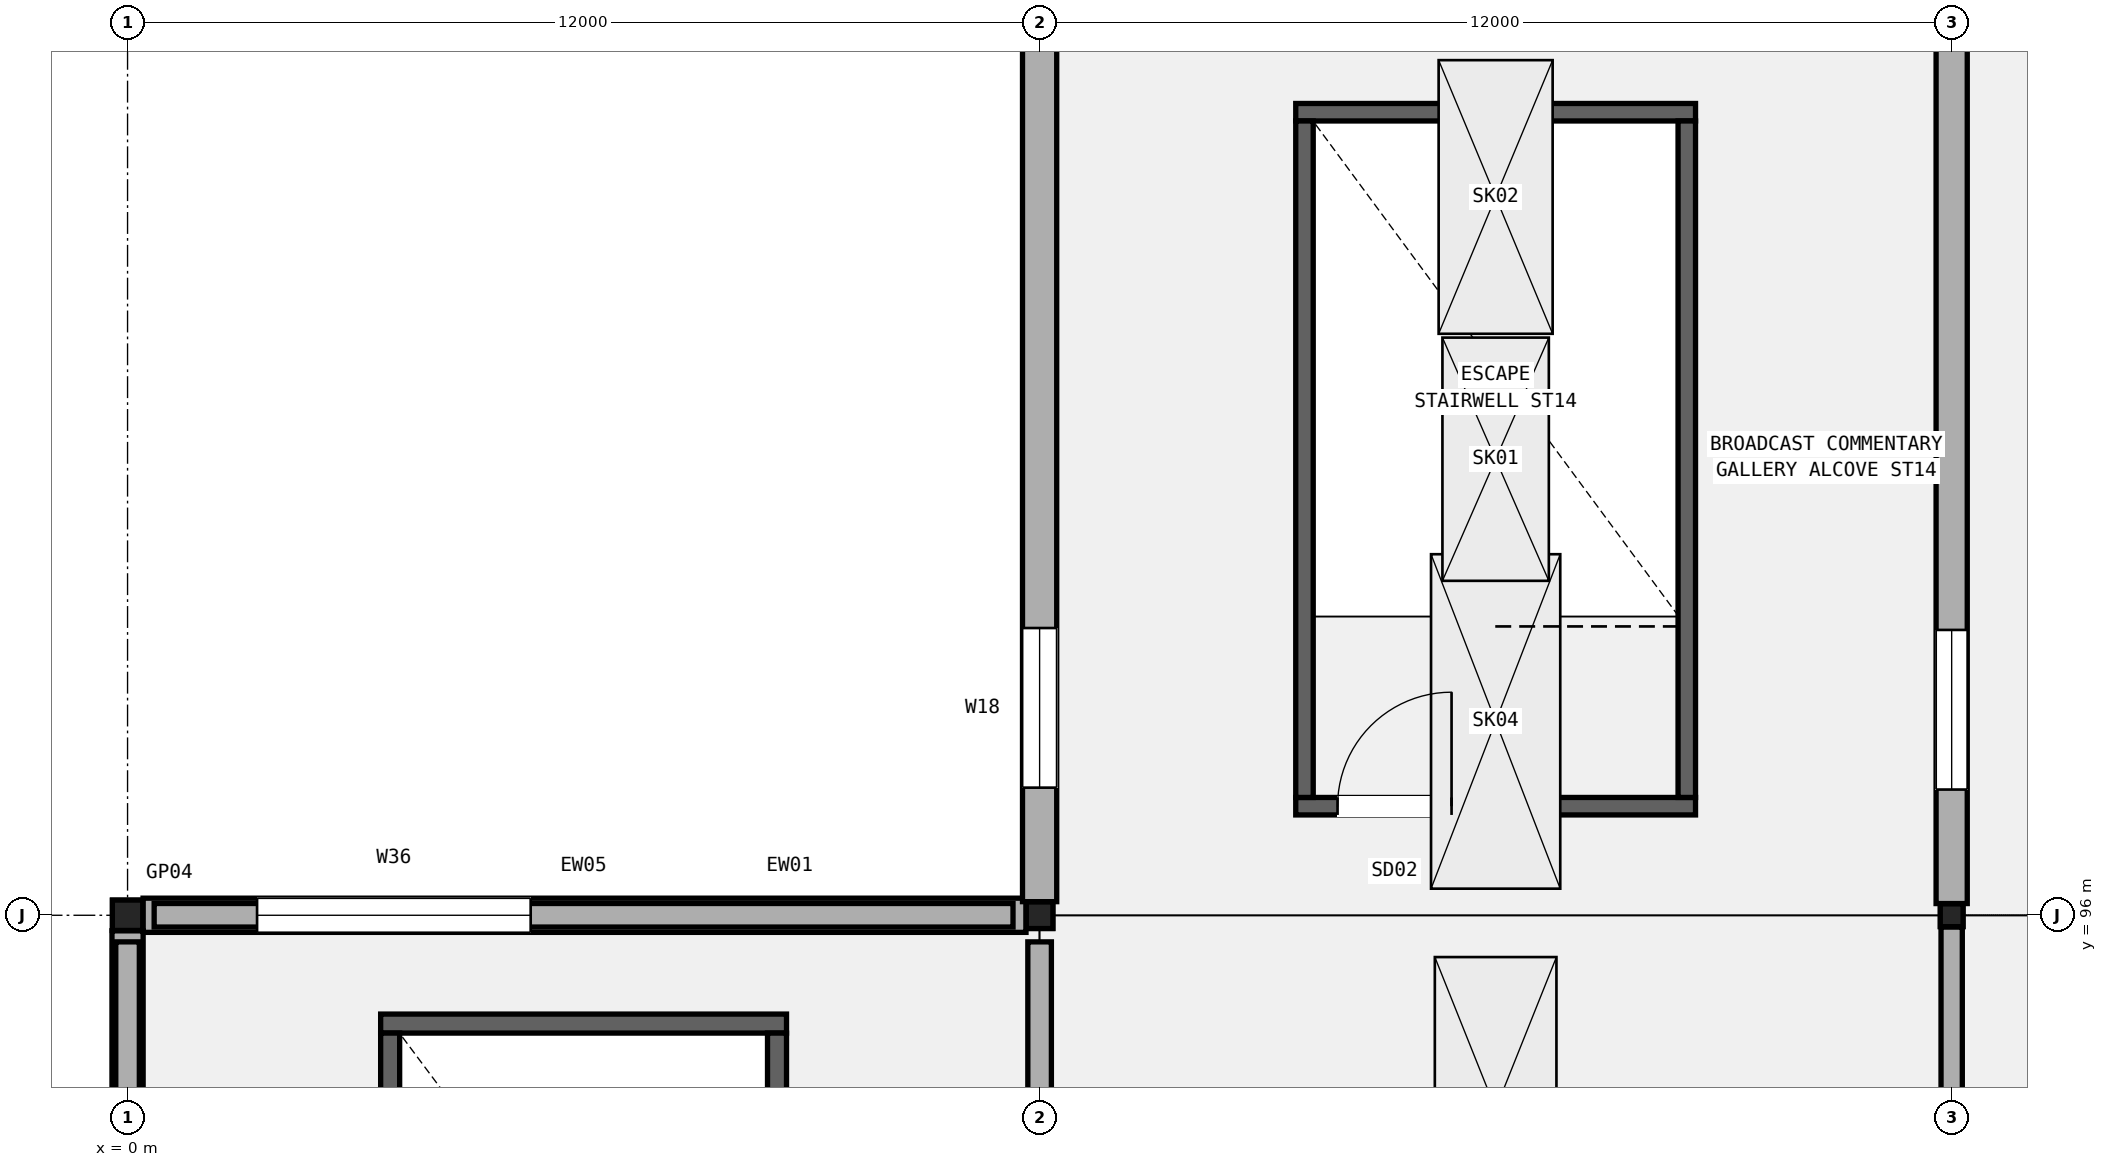
"""IFC4 building model, lengths in metres.
Left out: names, types, materials, properties, quantities, classifications, styles, units other than length and angle.
Written with IfcOpenShell. Run it as: python <this file> out.ifc"""

import sys

from ifc_helpers import new_model, si_unit, direction, frame, frame_2d, origin, origin_2d, place, context, subcontext, project, spatial, rectangle, hollow_rectangle, extrude, element, fill, save


model = new_model("IFC4")
c1 = context("Model", 3, precision=1e-05, world=origin(), true_north=direction((0.0, 1.0)))
c2 = subcontext(c1, "Body", "Model", "MODEL_VIEW")
j1 = project(units=[si_unit("LENGTHUNIT", "METRE"), si_unit("PLANEANGLEUNIT", "RADIAN")], contexts=[c1])
p1 = place(None, origin())
s1 = spatial("IfcSite", under=j1, at=p1, CompositionType="ELEMENT")
p2 = place(p1, origin())
s2 = spatial("IfcBuilding", under=s1, at=p2, CompositionType="ELEMENT")
p3 = place(p2, frame((0.0, 0.0, 25.8)))
s3 = spatial("IfcBuildingStorey", under=s2, at=p3, CompositionType="ELEMENT", Elevation=25.8)
p4 = place(p3, frame((0.0, 96.0, 0.0), z_axis=(0.0, 0.0, 1.0), x_axis=(1.0, 0.0, 0.0)))
e1 = element("IfcColumn", 1, at=p4, inside=s3, PredefinedType="COLUMN", context=c2, shape_type="SweptSolid", body=[
    extrude(hollow_rectangle(XDim=0.4, YDim=0.4, WallThickness=0.016, InnerFilletRadius=0.016, OuterFilletRadius=0.032, at=origin_2d()), origin(), (0.0, 0.0, 1.0), 5.4),
])
p5 = place(p3, frame((12.0, 96.0, 0.0), z_axis=(0.0, 0.0, 1.0), x_axis=(1.0, 0.0, 0.0)))
e2 = element("IfcColumn", 2, at=p5, inside=s3, PredefinedType="COLUMN", context=c2, shape_type="SweptSolid", body=[
    extrude(hollow_rectangle(XDim=0.35, YDim=0.35, WallThickness=0.016, InnerFilletRadius=0.016, OuterFilletRadius=0.032, at=origin_2d()), origin(), (0.0, 0.0, 1.0), 5.4),
])
p6 = place(p3, frame((24.0, 96.0, 0.0), z_axis=(0.0, 0.0, 1.0), x_axis=(1.0, 0.0, 0.0)))
e3 = element("IfcColumn", 3, at=p6, inside=s3, PredefinedType="COLUMN", context=c2, shape_type="SweptSolid", body=[
    extrude(hollow_rectangle(XDim=0.3, YDim=0.3, WallThickness=0.012, InnerFilletRadius=0.012, OuterFilletRadius=0.024, at=origin_2d()), origin(), (0.0, 0.0, 1.0), 5.4),
])
p7 = place(p3, frame((0.204, 96.0, 0.0), z_axis=(0.0, 0.0, 1.0), x_axis=(1.0, 0.0, 0.0)))
e4 = element("IfcWall", 4, at=p7, inside=s3, PredefinedType="SOLIDWALL", context=c2, shape_type="SweptSolid", body=[
    extrude(rectangle(XDim=11.617, YDim=0.45, at=frame_2d((5.809, 0.0))), origin(), (0.0, 0.0, 1.0), 4.452),
])
p8 = place(p7, frame((1.5, 0.0, 0.95)))
e5 = element("IfcOpeningElement", 5, at=p8, cuts=e4, PredefinedType="OPENING", context=c2, shape_type="SweptSolid", body=[
    extrude(rectangle(XDim=3.6, YDim=2.15, at=frame_2d((1.8, 1.075))), frame((0.0, 0.235, 0.0), z_axis=(0.0, -1.0, 0.0), x_axis=(1.0, 0.0, 0.0)), (0.0, 0.0, 1.0), 0.47),
])
p9 = place(p3, frame((0.0, 84.304, 0.0), z_axis=(0.0, 0.0, 1.0), x_axis=(0.0, 1.0, 0.0)))
e6 = element("IfcWall", 6, at=p9, inside=s3, PredefinedType="SOLIDWALL", context=c2, shape_type="SweptSolid", body=[
    extrude(rectangle(XDim=11.492, YDim=0.41, at=frame_2d((5.746, 0.0))), origin(), (0.0, 0.0, 1.0), 4.44),
])
p10 = place(p9, frame((1.5, 0.0, 0.95)))
e7 = element("IfcOpeningElement", 7, at=p10, cuts=e6, PredefinedType="OPENING", context=c2, shape_type="SweptSolid", body=[
    extrude(rectangle(XDim=0.9, YDim=2.1, at=frame_2d((0.45, 1.05))), frame((0.0, 0.215, 0.0), z_axis=(0.0, -1.0, 0.0), x_axis=(1.0, 0.0, 0.0)), (0.0, 0.0, 1.0), 0.43),
])
p11 = place(p3, frame((24.0, 84.179, 0.0), z_axis=(0.0, 0.0, 1.0), x_axis=(0.0, 1.0, 0.0)))
e8 = element("IfcWall", 8, at=p11, inside=s3, PredefinedType="SOLIDWALL", context=c2, shape_type="SweptSolid", body=[
    extrude(rectangle(XDim=11.667, YDim=0.28, at=frame_2d((5.833, 0.0))), origin(), (0.0, 0.0, 1.0), 4.13),
])
p12 = place(p11, frame((1.5, 0.0, 0.95)))
e9 = element("IfcOpeningElement", 9, at=p12, cuts=e8, PredefinedType="OPENING", context=c2, shape_type="SweptSolid", body=[
    extrude(rectangle(XDim=1.95, YDim=2.35, at=frame_2d((0.975, 1.175))), frame((0.0, 0.15, 0.0), z_axis=(0.0, -1.0, 0.0), x_axis=(1.0, 0.0, 0.0)), (0.0, 0.0, 1.0), 0.3),
])
p13 = place(p3, frame((12.0, 96.179, 0.0), z_axis=(0.0, 0.0, 1.0), x_axis=(0.0, 1.0, 0.0)))
e10 = element("IfcWall", 10, at=p13, inside=s3, PredefinedType="SOLIDWALL", context=c2, shape_type="SweptSolid", body=[
    extrude(rectangle(XDim=11.667, YDim=0.45, at=frame_2d((5.833, 0.0))), origin(), (0.0, 0.0, 1.0), 4.34),
])
p14 = place(p13, frame((1.5, 0.0, 0.95)))
e11 = element("IfcOpeningElement", 11, at=p14, cuts=e10, PredefinedType="OPENING", context=c2, shape_type="SweptSolid", body=[
    extrude(rectangle(XDim=2.1, YDim=1.85, at=frame_2d((1.05, 0.925))), frame((0.0, 0.235, 0.0), z_axis=(0.0, -1.0, 0.0), x_axis=(1.0, 0.0, 0.0)), (0.0, 0.0, 1.0), 0.47),
])
p15 = place(p3, frame((24.0, 96.154, 0.0), z_axis=(0.0, 0.0, 1.0), x_axis=(0.0, 1.0, 0.0)))
e12 = element("IfcWall", 12, at=p15, inside=s3, PredefinedType="SOLIDWALL", context=c2, shape_type="SweptSolid", body=[
    extrude(rectangle(XDim=11.717, YDim=0.41, at=frame_2d((5.858, 0.0))), origin(), (0.0, 0.0, 1.0), 4.13),
])
p16 = place(p15, frame((1.5, 0.0, 0.95)))
e13 = element("IfcOpeningElement", 13, at=p16, cuts=e12, PredefinedType="OPENING", context=c2, shape_type="SweptSolid", body=[
    extrude(rectangle(XDim=2.1, YDim=2.25, at=frame_2d((1.05, 1.125))), frame((0.0, 0.215, 0.0), z_axis=(0.0, -1.0, 0.0), x_axis=(1.0, 0.0, 0.0)), (0.0, 0.0, 1.0), 0.43),
])
for number, where, z_axis, x_axis in (
    (14, (0.35, 96.0, 5.4), (0.0, 0.0, 1.0), (1.0, 0.0, 0.0)),
    (15, (0.0, 84.35, 5.4), (0.0, 0.0, 1.0), (0.0, 1.0, 0.0)),
    (16, (12.0, 84.35, 5.4), (0.0, 0.0, 1.0), (0.0, 1.0, 0.0)),
):
    element("IfcWall", number, at=place(p3, frame(where, z_axis=z_axis, x_axis=x_axis)), inside=s3, PredefinedType="SOLIDWALL", context=c2, shape_type="SweptSolid", body=[
        extrude(rectangle(XDim=11.3, YDim=0.31, at=frame_2d((5.65, 0.0))), origin(), (0.0, 0.0, 1.0), 1.08),
    ])
p17 = place(p3, frame((3.33, 94.575, 0.0), z_axis=(0.0, 0.0, 1.0), x_axis=(1.0, 0.0, 0.0)))
e17 = element("IfcWall", 17, at=p17, inside=s3, PredefinedType="SHEAR", context=c2, shape_type="SweptSolid", body=[
    extrude(rectangle(XDim=5.34, YDim=0.25, at=frame_2d((2.67, 0.0))), origin(), (0.0, 0.0, 1.0), 5.04),
])
for number, where, z_axis, x_axis in (
    (18, (3.455, 85.55, 0.0), (0.0, 0.0, 1.0), (0.0, 1.0, 0.0)),
    (19, (8.545, 85.55, 0.0), (0.0, 0.0, 1.0), (0.0, 1.0, 0.0)),
):
    element("IfcWall", number, at=place(p3, frame(where, z_axis=z_axis, x_axis=x_axis)), inside=s3, PredefinedType="SHEAR", context=c2, shape_type="SweptSolid", body=[
        extrude(rectangle(XDim=8.9, YDim=0.25, at=frame_2d((4.45, 0.0))), origin(), (0.0, 0.0, 1.0), 5.04),
    ])
p18 = place(p3, frame((15.37, 97.435, 0.0), z_axis=(0.0, 0.0, 1.0), x_axis=(1.0, 0.0, 0.0)))
e20 = element("IfcWall", 20, at=p18, inside=s3, PredefinedType="SHEAR", context=c2, shape_type="SweptSolid", body=[
    extrude(rectangle(XDim=5.26, YDim=0.23, at=frame_2d((2.63, 0.0))), origin(), (0.0, 0.0, 1.0), 5.04),
])
p19 = place(p18, frame((0.55, 0.0, 0.0)))
e21 = element("IfcOpeningElement", 21, at=p19, cuts=e20, PredefinedType="OPENING", context=c2, shape_type="SweptSolid", body=[
    extrude(rectangle(XDim=1.5, YDim=2.2, at=frame_2d((0.75, 1.1))), frame((0.0, 0.125, 0.0), z_axis=(0.0, -1.0, 0.0), x_axis=(1.0, 0.0, 0.0)), (0.0, 0.0, 1.0), 0.25),
])
p20 = place(p3, frame((15.37, 106.565, 0.0), z_axis=(0.0, 0.0, 1.0), x_axis=(1.0, 0.0, 0.0)))
e22 = element("IfcWall", 22, at=p20, inside=s3, PredefinedType="SHEAR", context=c2, shape_type="SweptSolid", body=[
    extrude(rectangle(XDim=5.26, YDim=0.23, at=frame_2d((2.63, 0.0))), origin(), (0.0, 0.0, 1.0), 5.04),
])
for number, where, z_axis, x_axis in (
    (23, (15.485, 97.55, 0.0), (0.0, 0.0, 1.0), (0.0, 1.0, 0.0)),
    (24, (20.515, 97.55, 0.0), (0.0, 0.0, 1.0), (0.0, 1.0, 0.0)),
):
    element("IfcWall", number, at=place(p3, frame(where, z_axis=z_axis, x_axis=x_axis)), inside=s3, PredefinedType="SHEAR", context=c2, shape_type="SweptSolid", body=[
        extrude(rectangle(XDim=8.9, YDim=0.23, at=frame_2d((4.45, 0.0))), origin(), (0.0, 0.0, 1.0), 5.04),
    ])
p21 = place(p8, origin())
e25 = element("IfcWindow", 25, at=p21, inside=s3, PartitioningType="SINGLE_PANEL", PredefinedType="WINDOW", context=c2, shape_type="SweptSolid", body=[
    extrude(rectangle(XDim=3.6, YDim=2.15, at=frame_2d((1.8, 1.075))), frame((0.0, 0.03, 0.0), z_axis=(0.0, -1.0, 0.0), x_axis=(1.0, 0.0, 0.0)), (0.0, 0.0, 1.0), 0.06),
])
fill(e5, e25)
p22 = place(p14, origin())
e26 = element("IfcWindow", 26, at=p22, inside=s3, PartitioningType="SINGLE_PANEL", PredefinedType="WINDOW", context=c2, shape_type="SweptSolid", body=[
    extrude(rectangle(XDim=2.1, YDim=1.85, at=frame_2d((1.05, 0.925))), frame((0.0, 0.03, 0.0), z_axis=(0.0, -1.0, 0.0), x_axis=(1.0, 0.0, 0.0)), (0.0, 0.0, 1.0), 0.06),
])
fill(e11, e26)
p23 = place(p16, origin())
e27 = element("IfcWindow", 27, at=p23, inside=s3, PartitioningType="SINGLE_PANEL", PredefinedType="WINDOW", context=c2, shape_type="SweptSolid", body=[
    extrude(rectangle(XDim=2.1, YDim=2.25, at=frame_2d((1.05, 1.125))), frame((0.0, 0.03, 0.0), z_axis=(0.0, -1.0, 0.0), x_axis=(1.0, 0.0, 0.0)), (0.0, 0.0, 1.0), 0.06),
])
fill(e13, e27)
p24 = place(p2, frame((0.0, 0.0, 31.2)))
p25 = place(p24, frame((0.0, 0.0, -0.36)))
p26 = place(p25, frame((18.0, 93.45, 0.0)))
p27 = place(p26, frame((0.0, 0.0, 0.31)))
e28 = element("IfcWindow", 28, at=p27, inside=s3, PartitioningType="SINGLE_PANEL", PredefinedType="SKYLIGHT", context=c2, shape_type="SweptSolid", body=[
    extrude(rectangle(XDim=4.0, YDim=1.6, at=origin_2d()), origin(), (0.0, 0.0, 1.0), 0.05),
])
p28 = place(p24, frame((0.0, 0.0, -0.36)))
p29 = place(p28, frame((18.0, 98.55, 0.0)))
p30 = place(p29, frame((0.0, 0.0, 0.31)))
e29 = element("IfcWindow", 29, at=p30, inside=s3, PartitioningType="SINGLE_PANEL", PredefinedType="SKYLIGHT", context=c2, shape_type="SweptSolid", body=[
    extrude(rectangle(XDim=4.4, YDim=1.7, at=origin_2d()), origin(), (0.0, 0.0, 1.0), 0.05),
])
p31 = place(p28, frame((18.0, 102.0, 0.0)))
p32 = place(p31, frame((0.0, 0.0, 0.31)))
e30 = element("IfcWindow", 30, at=p32, inside=s3, PartitioningType="SINGLE_PANEL", PredefinedType="SKYLIGHT", context=c2, shape_type="SweptSolid", body=[
    extrude(rectangle(XDim=3.2, YDim=1.4, at=origin_2d()), origin(), (0.0, 0.0, 1.0), 0.05),
])
p33 = place(p28, frame((18.0, 105.45, 0.0)))
p34 = place(p33, frame((0.0, 0.0, 0.31)))
e31 = element("IfcWindow", 31, at=p34, inside=s3, PartitioningType="SINGLE_PANEL", PredefinedType="SKYLIGHT", context=c2, shape_type="SweptSolid", body=[
    extrude(rectangle(XDim=3.6, YDim=1.5, at=origin_2d()), origin(), (0.0, 0.0, 1.0), 0.05),
])
p35 = place(p19, origin())
e32 = element("IfcDoor", 32, at=p35, inside=s3, OperationType="SINGLE_SWING_RIGHT", PredefinedType="DOOR", context=c2, shape_type="SweptSolid", body=[
    extrude(rectangle(XDim=1.5, YDim=2.2, at=frame_2d((0.75, 1.1))), frame((0.0, 0.025, 0.0), z_axis=(0.0, -1.0, 0.0), x_axis=(1.0, 0.0, 0.0)), (0.0, 0.0, 1.0), 0.05),
])
fill(e21, e32)
save(model, sys.argv[1])
